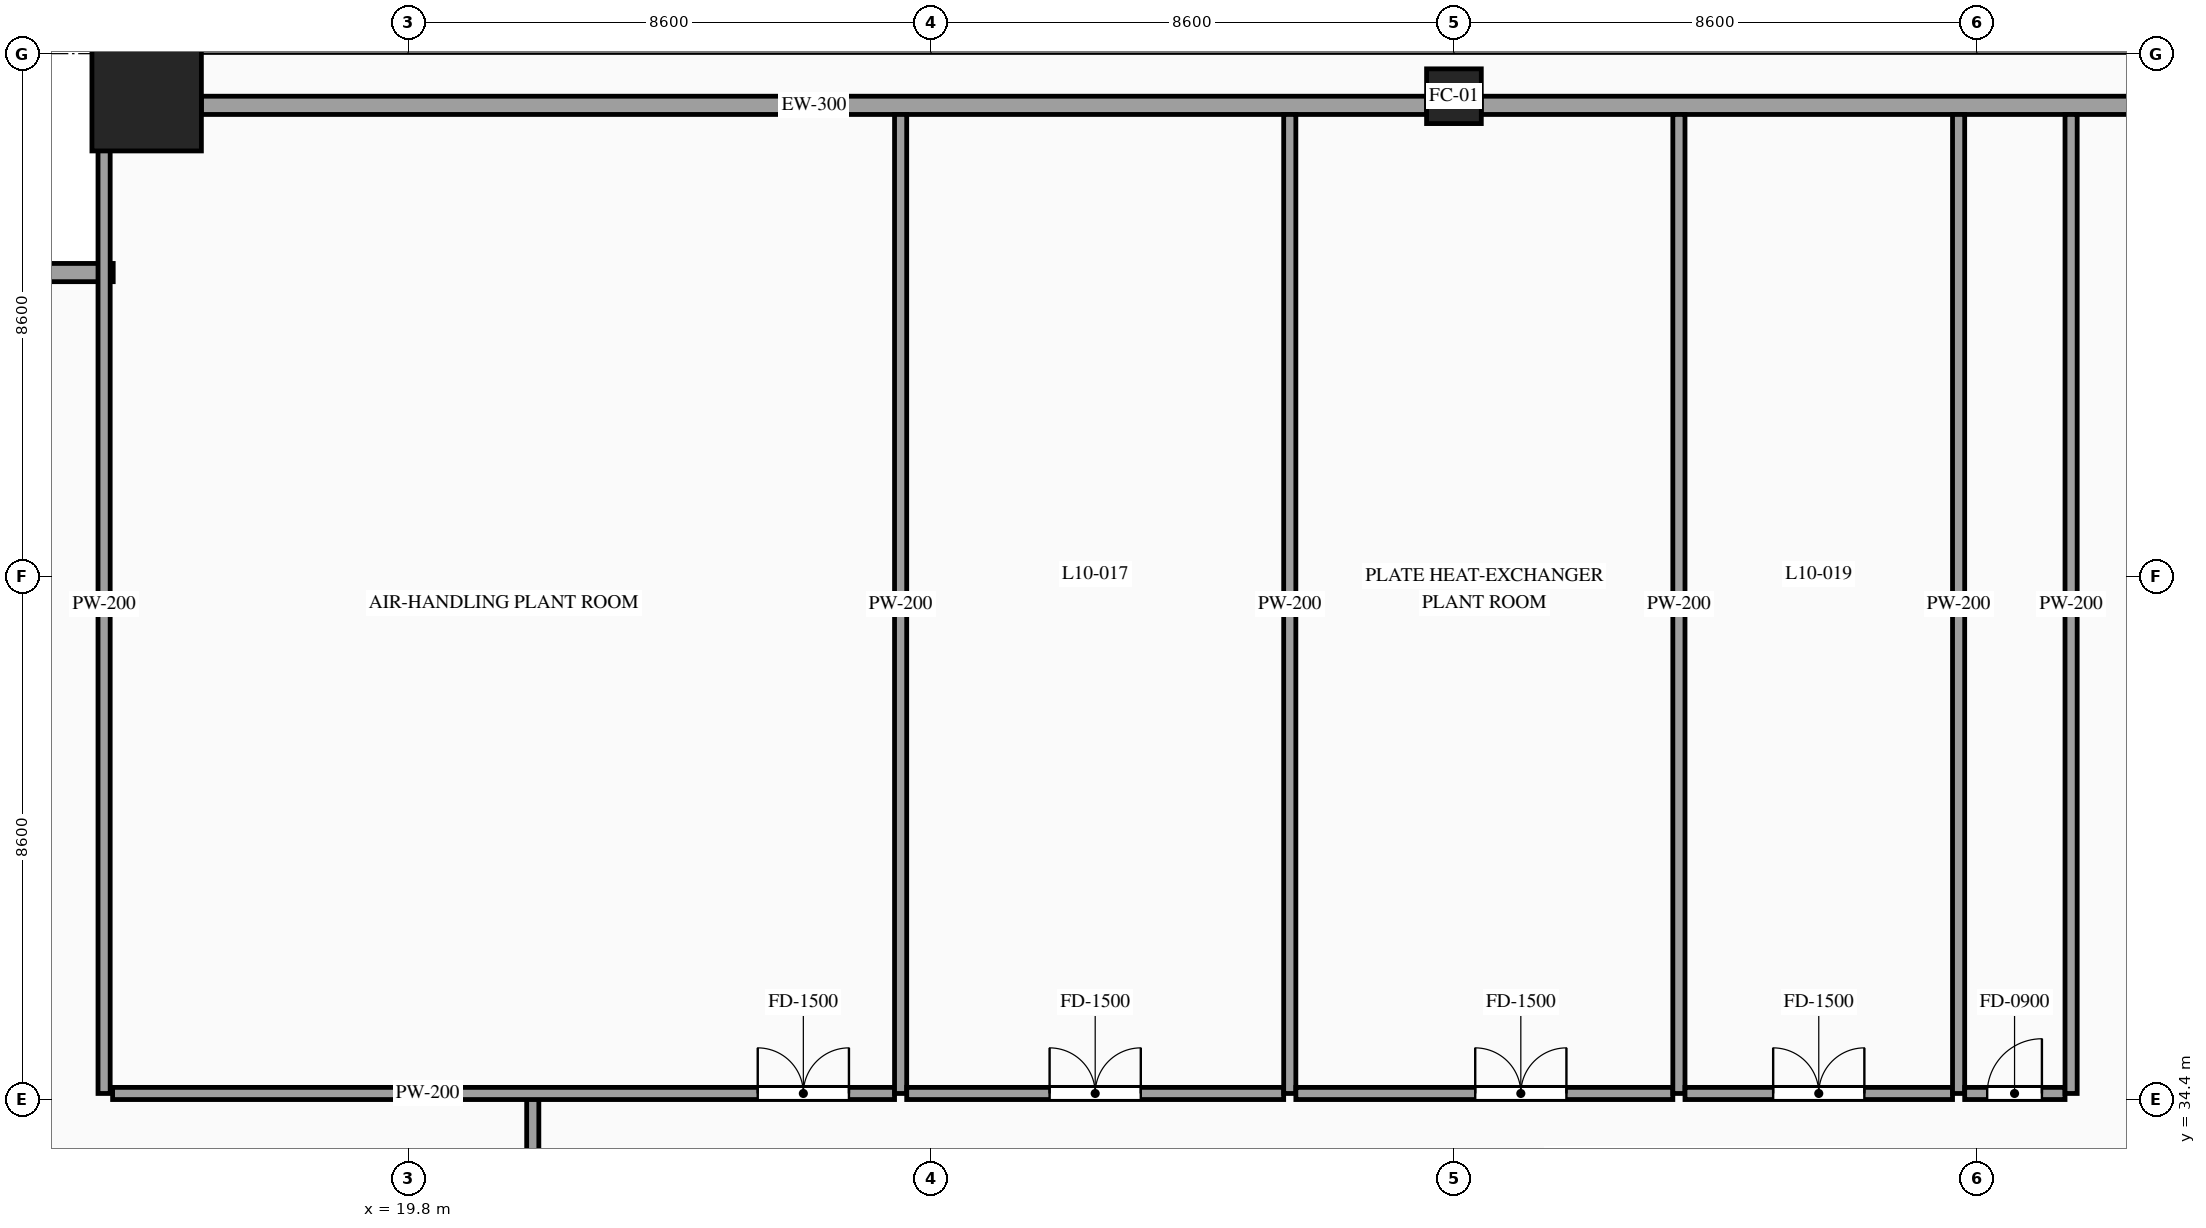
"""IFC4 building model, lengths in metres.
Left out: names, types, materials, properties, quantities, classifications, styles, units other than length and angle.
Written with IfcOpenShell. Run it as: python <this file> out.ifc"""

import sys

from ifc_helpers import new_model, si_unit, direction, frame, frame_2d, origin, origin_2d, place, context, subcontext, project, spatial, rectangle, hollow_rectangle, extrude, source, transform, mapped, element, fill, save


model = new_model("IFC4")
c1 = context("Model", 3, precision=1e-05, world=origin(), true_north=direction((0.0, 1.0)))
c2 = subcontext(c1, "Body", "Model", "MODEL_VIEW")
j1 = project(units=[si_unit("LENGTHUNIT", "METRE"), si_unit("PLANEANGLEUNIT", "RADIAN")], contexts=[c1])
p1 = place(None, origin())
s1 = spatial("IfcSite", under=j1, at=p1, CompositionType="ELEMENT")
p2 = place(p1, origin())
s2 = spatial("IfcBuilding", under=s1, at=p2, CompositionType="ELEMENT")
p3 = place(p2, frame((0.0, 0.0, 41.4)))
s3 = spatial("IfcBuildingStorey", under=s2, at=p3, CompositionType="ELEMENT", Elevation=41.4)
m1 = source(origin(), c2, "Body", "SweptSolid", [
    extrude(hollow_rectangle(XDim=1.8, YDim=1.8, WallThickness=0.08, at=origin_2d()), origin(), (0.0, 0.0, 1.0), 4.6),
])
p4 = place(p3, frame((15.5, 50.9, 0.0), z_axis=(0.0, 0.0, 1.0), x_axis=(1.0, 0.0, 0.0)))
e1 = element("IfcColumn", 1, at=p4, inside=s3, PredefinedType="COLUMN", context=c2, shape_type="MappedRepresentation", body=[
    mapped(m1, transform((0.0, 0.0, 0.0), scale=1.0)),
])
m2 = source(origin(), c2, "Body", "SweptSolid", [
    extrude(hollow_rectangle(XDim=0.9, YDim=0.9, WallThickness=0.042, at=origin_2d()), origin(), (0.0, 0.0, 1.0), 4.6),
])
p5 = place(p3, frame((37.0, 50.9, 0.0), z_axis=(0.0, 0.0, 1.0), x_axis=(1.0, 0.0, 0.0)))
e2 = element("IfcColumn", 2, at=p5, inside=s3, PredefinedType="COLUMN", context=c2, shape_type="MappedRepresentation", body=[
    mapped(m2, transform((0.0, 0.0, 0.0), scale=1.0)),
])
m3 = source(origin(), c2, "Body", "SweptSolid", [
    extrude(rectangle(XDim=2.15, YDim=0.3, at=frame_2d((1.075, 0.0))), origin(), (0.0, 0.0, 1.0), 4.38),
])
p6 = place(p3, frame((14.95, 48.0, 0.0), z_axis=(0.0, 0.0, 1.0), x_axis=(-1.0, 0.0, 0.0)))
e3 = element("IfcWall", 3, at=p6, inside=s3, PredefinedType="SOLIDWALL", context=c2, shape_type="MappedRepresentation", body=[
    mapped(m3, transform((0.0, 0.0, 0.0), scale=1.0)),
])
m4 = source(origin(), c2, "Body", "SweptSolid", [
    extrude(rectangle(XDim=20.15, YDim=0.3, at=frame_2d((10.075, 0.0))), origin(), (0.0, 0.0, 1.0), 3.775),
])
for number, where, z_axis, x_axis in (
    (4, (16.4, 50.75, 0.0), (0.0, 0.0, 1.0), (1.0, 0.0, 0.0)),
    (5, (37.45, 50.75, 0.0), (0.0, 0.0, 1.0), (1.0, 0.0, 0.0)),
):
    element("IfcWall", number, at=place(p3, frame(where, z_axis=z_axis, x_axis=x_axis)), inside=s3, PredefinedType="SOLIDWALL", context=c2, shape_type="MappedRepresentation", body=[
        mapped(m4, transform((0.0, 0.0, 0.0), scale=1.0)),
    ])
m5 = source(origin(), c2, "Body", "SweptSolid", [
    extrude(rectangle(XDim=16.1, YDim=0.2, at=frame_2d((8.05, 0.0))), origin(), (0.0, 0.0, 1.0), 4.38),
])
p7 = place(p3, frame((14.8, 34.5, 0.0), z_axis=(0.0, 0.0, 1.0), x_axis=(0.0, 1.0, 0.0)))
e6 = element("IfcWall", 6, at=p7, inside=s3, PredefinedType="PARTITIONING", context=c2, shape_type="MappedRepresentation", body=[
    mapped(m5, transform((0.0, 0.0, 0.0), scale=1.0)),
])
p8 = place(p3, frame((21.85, 28.1, 0.0), z_axis=(0.0, 0.0, 1.0), x_axis=(0.0, 1.0, 0.0)))
e7 = element("IfcWall", 7, at=p8, inside=s3, PredefinedType="PARTITIONING", context=c2, shape_type="SweptSolid", body=[
    extrude(rectangle(XDim=6.4, YDim=0.2, at=frame_2d((3.2, 0.0))), origin(), (0.0, 0.0, 1.0), 4.38),
])
p9 = place(p8, frame((0.7, 0.0, 0.0)))
e8 = element("IfcOpeningElement", 8, at=p9, cuts=e7, PredefinedType="OPENING", context=c2, shape_type="SweptSolid", body=[
    extrude(rectangle(XDim=1.0, YDim=2.2, at=frame_2d((0.5, 1.1))), frame((0.0, 0.115, 0.0), z_axis=(0.0, -1.0, 0.0), x_axis=(1.0, 0.0, 0.0)), (0.0, 0.0, 1.0), 0.23),
])
p10 = place(p3, frame((14.94, 34.5, 0.0), z_axis=(0.0, 0.0, 1.0), x_axis=(1.0, 0.0, 0.0)))
e9 = element("IfcWall", 9, at=p10, inside=s3, PredefinedType="PARTITIONING", context=c2, shape_type="SweptSolid", body=[
    extrude(rectangle(XDim=12.86, YDim=0.2, at=frame_2d((6.43, 0.0))), origin(), (0.0, 0.0, 1.0), 4.38),
])
p11 = place(p10, frame((10.61, 0.0, 0.0)))
e10 = element("IfcOpeningElement", 10, at=p11, cuts=e9, PredefinedType="OPENING", context=c2, shape_type="SweptSolid", body=[
    extrude(rectangle(XDim=1.5, YDim=2.3, at=frame_2d((0.75, 1.15))), frame((0.0, 0.115, 0.0), z_axis=(0.0, -1.0, 0.0), x_axis=(1.0, 0.0, 0.0)), (0.0, 0.0, 1.0), 0.23),
])
p12 = place(p3, frame((27.9, 34.5, 0.0), z_axis=(0.0, 0.0, 1.0), x_axis=(0.0, 1.0, 0.0)))
e11 = element("IfcWall", 11, at=p12, inside=s3, PredefinedType="PARTITIONING", context=c2, shape_type="MappedRepresentation", body=[
    mapped(m5, transform((0.0, 0.0, 0.0), scale=1.0)),
])
p13 = place(p3, frame((28.0, 34.5, 0.0), z_axis=(0.0, 0.0, 1.0), x_axis=(1.0, 0.0, 0.0)))
e12 = element("IfcWall", 12, at=p13, inside=s3, PredefinedType="PARTITIONING", context=c2, shape_type="SweptSolid", body=[
    extrude(rectangle(XDim=6.2, YDim=0.2, at=frame_2d((3.1, 0.0))), origin(), (0.0, 0.0, 1.0), 4.38),
])
p14 = place(p13, frame((2.35, 0.0, 0.0)))
e13 = element("IfcOpeningElement", 13, at=p14, cuts=e12, PredefinedType="OPENING", context=c2, shape_type="SweptSolid", body=[
    extrude(rectangle(XDim=1.5, YDim=2.3, at=frame_2d((0.75, 1.15))), frame((0.0, 0.115, 0.0), z_axis=(0.0, -1.0, 0.0), x_axis=(1.0, 0.0, 0.0)), (0.0, 0.0, 1.0), 0.23),
])
p15 = place(p3, frame((34.3, 34.5, 0.0), z_axis=(0.0, 0.0, 1.0), x_axis=(0.0, 1.0, 0.0)))
e14 = element("IfcWall", 14, at=p15, inside=s3, PredefinedType="PARTITIONING", context=c2, shape_type="MappedRepresentation", body=[
    mapped(m5, transform((0.0, 0.0, 0.0), scale=1.0)),
])
p16 = place(p3, frame((34.4, 34.5, 0.0), z_axis=(0.0, 0.0, 1.0), x_axis=(1.0, 0.0, 0.0)))
e15 = element("IfcWall", 15, at=p16, inside=s3, PredefinedType="PARTITIONING", context=c2, shape_type="SweptSolid", body=[
    extrude(rectangle(XDim=6.2, YDim=0.2, at=frame_2d((3.1, 0.0))), origin(), (0.0, 0.0, 1.0), 4.38),
])
p17 = place(p16, frame((2.95, 0.0, 0.0)))
e16 = element("IfcOpeningElement", 16, at=p17, cuts=e15, PredefinedType="OPENING", context=c2, shape_type="SweptSolid", body=[
    extrude(rectangle(XDim=1.5, YDim=2.3, at=frame_2d((0.75, 1.15))), frame((0.0, 0.115, 0.0), z_axis=(0.0, -1.0, 0.0), x_axis=(1.0, 0.0, 0.0)), (0.0, 0.0, 1.0), 0.23),
])
p18 = place(p3, frame((40.7, 34.5, 0.0), z_axis=(0.0, 0.0, 1.0), x_axis=(0.0, 1.0, 0.0)))
e17 = element("IfcWall", 17, at=p18, inside=s3, PredefinedType="PARTITIONING", context=c2, shape_type="MappedRepresentation", body=[
    mapped(m5, transform((0.0, 0.0, 0.0), scale=1.0)),
])
p19 = place(p3, frame((40.8, 34.5, 0.0), z_axis=(0.0, 0.0, 1.0), x_axis=(1.0, 0.0, 0.0)))
e18 = element("IfcWall", 18, at=p19, inside=s3, PredefinedType="PARTITIONING", context=c2, shape_type="SweptSolid", body=[
    extrude(rectangle(XDim=4.4, YDim=0.2, at=frame_2d((2.2, 0.0))), origin(), (0.0, 0.0, 1.0), 4.38),
])
p20 = place(p19, frame((1.45, 0.0, 0.0)))
e19 = element("IfcOpeningElement", 19, at=p20, cuts=e18, PredefinedType="OPENING", context=c2, shape_type="SweptSolid", body=[
    extrude(rectangle(XDim=1.5, YDim=2.3, at=frame_2d((0.75, 1.15))), frame((0.0, 0.115, 0.0), z_axis=(0.0, -1.0, 0.0), x_axis=(1.0, 0.0, 0.0)), (0.0, 0.0, 1.0), 0.23),
])
p21 = place(p3, frame((45.3, 34.5, 0.0), z_axis=(0.0, 0.0, 1.0), x_axis=(0.0, 1.0, 0.0)))
e20 = element("IfcWall", 20, at=p21, inside=s3, PredefinedType="PARTITIONING", context=c2, shape_type="MappedRepresentation", body=[
    mapped(m5, transform((0.0, 0.0, 0.0), scale=1.0)),
])
p22 = place(p3, frame((45.4, 34.5, 0.0), z_axis=(0.0, 0.0, 1.0), x_axis=(1.0, 0.0, 0.0)))
e21 = element("IfcWall", 21, at=p22, inside=s3, PredefinedType="PARTITIONING", context=c2, shape_type="SweptSolid", body=[
    extrude(rectangle(XDim=1.65, YDim=0.2, at=frame_2d((0.825, 0.0))), origin(), (0.0, 0.0, 1.0), 4.38),
])
p23 = place(p22, frame((0.37, 0.0, 0.0)))
e22 = element("IfcOpeningElement", 22, at=p23, cuts=e21, PredefinedType="OPENING", context=c2, shape_type="SweptSolid", body=[
    extrude(rectangle(XDim=0.9, YDim=2.15, at=frame_2d((0.45, 1.075))), frame((0.0, 0.115, 0.0), z_axis=(0.0, -1.0, 0.0), x_axis=(1.0, 0.0, 0.0)), (0.0, 0.0, 1.0), 0.23),
])
p24 = place(p3, frame((47.15, 34.5, 0.0), z_axis=(0.0, 0.0, 1.0), x_axis=(0.0, 1.0, 0.0)))
e23 = element("IfcWall", 23, at=p24, inside=s3, PredefinedType="PARTITIONING", context=c2, shape_type="MappedRepresentation", body=[
    mapped(m5, transform((0.0, 0.0, 0.0), scale=1.0)),
])
m6 = source(origin(), c2, "Body", "SweptSolid", [
    extrude(rectangle(XDim=1.5, YDim=2.3, at=frame_2d((0.75, 1.15))), frame((0.0, 0.025, 0.0), z_axis=(0.0, -1.0, 0.0), x_axis=(1.0, 0.0, 0.0)), (0.0, 0.0, 1.0), 0.05),
])
p25 = place(p11, origin())
e24 = element("IfcDoor", 24, at=p25, inside=s3, OperationType="DOUBLE_DOOR_SINGLE_SWING", PredefinedType="DOOR", context=c2, shape_type="MappedRepresentation", body=[
    mapped(m6, transform((0.0, 0.0, 0.0), scale=1.0)),
])
fill(e10, e24)
p26 = place(p14, origin())
e25 = element("IfcDoor", 25, at=p26, inside=s3, OperationType="DOUBLE_DOOR_SINGLE_SWING", PredefinedType="DOOR", context=c2, shape_type="MappedRepresentation", body=[
    mapped(m6, transform((0.0, 0.0, 0.0), scale=1.0)),
])
fill(e13, e25)
p27 = place(p17, origin())
e26 = element("IfcDoor", 26, at=p27, inside=s3, OperationType="DOUBLE_DOOR_SINGLE_SWING", PredefinedType="DOOR", context=c2, shape_type="MappedRepresentation", body=[
    mapped(m6, transform((0.0, 0.0, 0.0), scale=1.0)),
])
fill(e16, e26)
p28 = place(p20, origin())
e27 = element("IfcDoor", 27, at=p28, inside=s3, OperationType="DOUBLE_DOOR_SINGLE_SWING", PredefinedType="DOOR", context=c2, shape_type="MappedRepresentation", body=[
    mapped(m6, transform((0.0, 0.0, 0.0), scale=1.0)),
])
fill(e19, e27)
m7 = source(origin(), c2, "Body", "SweptSolid", [
    extrude(rectangle(XDim=0.9, YDim=2.15, at=frame_2d((0.45, 1.075))), frame((0.0, 0.025, 0.0), z_axis=(0.0, -1.0, 0.0), x_axis=(1.0, 0.0, 0.0)), (0.0, 0.0, 1.0), 0.05),
])
p29 = place(p23, origin())
e28 = element("IfcDoor", 28, at=p29, inside=s3, OperationType="SINGLE_SWING_RIGHT", PredefinedType="DOOR", context=c2, shape_type="MappedRepresentation", body=[
    mapped(m7, transform((0.0, 0.0, 0.0), scale=1.0)),
])
fill(e22, e28)
save(model, sys.argv[1])
